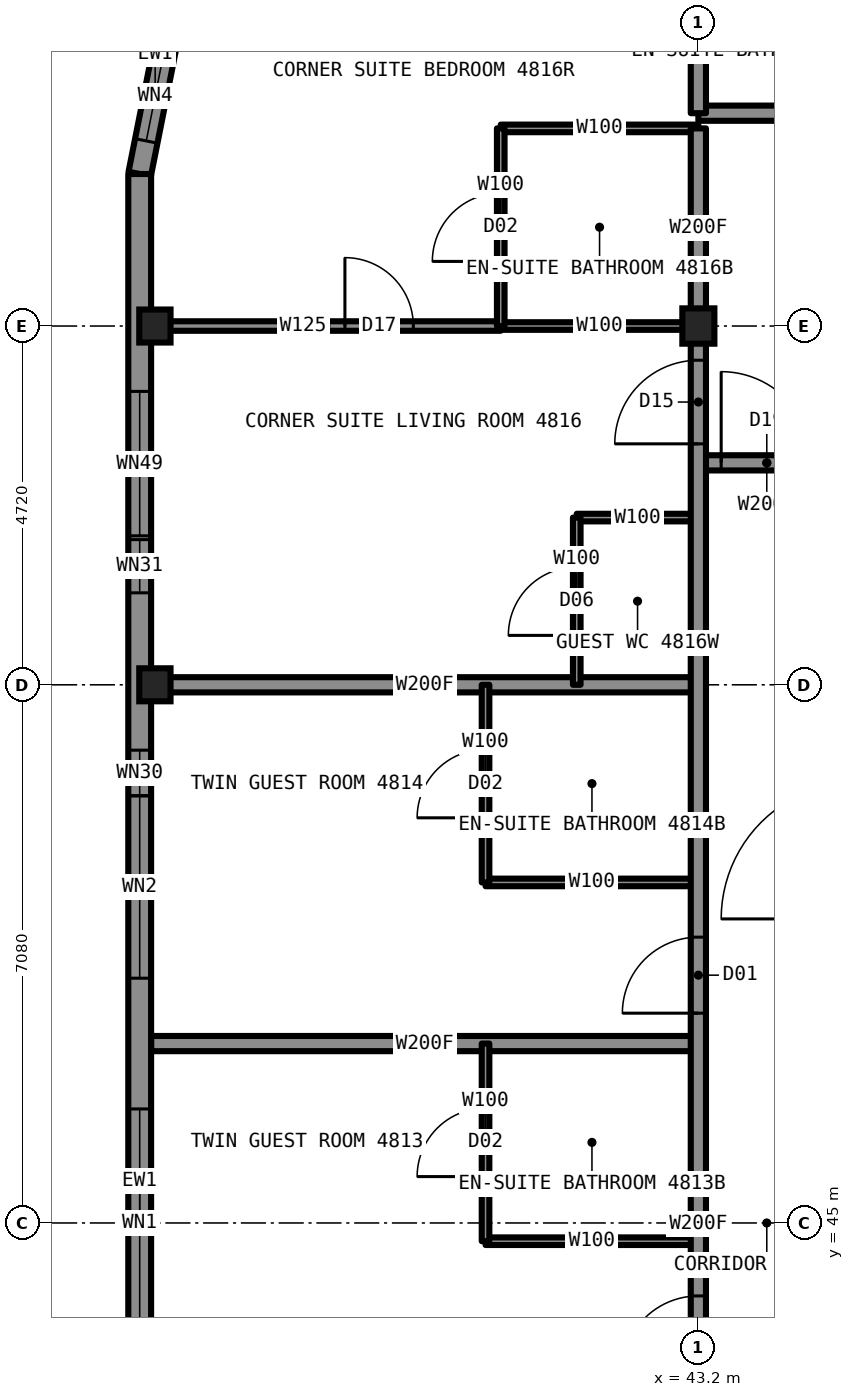
"""IFC4 building model, lengths in metres.
Left out: names, types, materials, properties, quantities, classifications, styles, units other than length and angle.
Written with IfcOpenShell. Run it as: python <this file> out.ifc"""

import sys

from ifc_helpers import new_model, si_unit, direction, frame, frame_2d, origin, origin_2d, place, context, subcontext, project, spatial, rectangle, i_section, extrude, element, fill, save


model = new_model("IFC4")
c1 = context("Model", 3, precision=1e-05, world=origin(), true_north=direction((0.0, 1.0)))
c2 = subcontext(c1, "Body", "Model", "MODEL_VIEW")
j1 = project(units=[si_unit("LENGTHUNIT", "METRE"), si_unit("PLANEANGLEUNIT", "RADIAN")], contexts=[c1])
p1 = place(None, origin())
s1 = spatial("IfcSite", under=j1, at=p1, CompositionType="ELEMENT")
p2 = place(p1, origin())
s2 = spatial("IfcBuilding", under=s1, at=p2, CompositionType="ELEMENT")
p3 = place(p2, frame((0.0, 0.0, 172.3)))
s3 = spatial("IfcBuildingStorey", under=s2, at=p3, CompositionType="ELEMENT", Elevation=172.3)
for number, where, z_axis, x_axis in (
    (1, (36.05, 52.08, 0.0), (0.0, 0.0, 1.0), (1.0, 0.0, 0.0)),
    (2, (36.05, 56.8, 0.0), (0.0, 0.0, 1.0), (1.0, 0.0, 0.0)),
):
    element("IfcColumn", number, at=place(p3, frame(where, z_axis=z_axis, x_axis=x_axis)), inside=s3, PredefinedType="COLUMN", context=c2, shape_type="SweptSolid", body=[
        extrude(i_section(OverallWidth=0.411, OverallDepth=0.434, WebThickness=0.036, FlangeThickness=0.057, at=origin_2d()), origin(), (0.0, 0.0, 1.0), 3.5),
    ])
p4 = place(p3, frame((43.2, 56.8, 0.0), z_axis=(0.0, 0.0, 1.0), x_axis=(1.0, 0.0, 0.0)))
e3 = element("IfcColumn", 3, at=p4, inside=s3, PredefinedType="COLUMN", context=c2, shape_type="SweptSolid", body=[
    extrude(i_section(OverallWidth=0.422, OverallDepth=0.465, WebThickness=0.045, FlangeThickness=0.073, at=origin_2d()), origin(), (0.0, 0.0, 1.0), 3.5),
])
p5 = place(p3, frame((40.4, 44.76, 0.0), z_axis=(0.0, 0.0, 1.0), x_axis=(1.0, 0.0, 0.0)))
e4 = element("IfcWall", 4, at=p5, inside=s3, PredefinedType="PARTITIONING", context=c2, shape_type="SweptSolid", body=[
    extrude(rectangle(XDim=2.8, YDim=0.1, at=frame_2d((1.4, 0.0))), origin(), (0.0, 0.0, 1.0), 3.33),
])
p6 = place(p3, frame((43.2, 55.0, 0.0), z_axis=(0.0, 0.0, 1.0), x_axis=(1.0, 0.0, 0.0)))
e5 = element("IfcWall", 5, at=p6, inside=s3, PredefinedType="PARTITIONING", context=c2, shape_type="SweptSolid", body=[
    extrude(rectangle(XDim=1.8, YDim=0.2, at=frame_2d((0.9, 0.0))), origin(), (0.0, 0.0, 1.0), 3.33),
])
p7 = place(p6, frame((0.3, 0.0, 0.0)))
e6 = element("IfcOpeningElement", 6, at=p7, cuts=e5, PredefinedType="OPENING", context=c2, shape_type="SweptSolid", body=[
    extrude(rectangle(XDim=1.2, YDim=2.2, at=frame_2d((0.6, 1.1))), frame((0.0, 0.11, 0.0), z_axis=(0.0, -1.0, 0.0), x_axis=(1.0, 0.0, 0.0)), (0.0, 0.0, 1.0), 0.22),
])
p8 = place(p3, frame((40.6, 56.8, 0.0), z_axis=(0.0, 0.0, 1.0), x_axis=(1.0, 0.0, 0.0)))
e7 = element("IfcWall", 7, at=p8, inside=s3, PredefinedType="PARTITIONING", context=c2, shape_type="SweptSolid", body=[
    extrude(rectangle(XDim=2.6, YDim=0.1, at=frame_2d((1.3, 0.0))), origin(), (0.0, 0.0, 1.0), 2.573),
])
p9 = place(p3, frame((36.0, 56.8, 0.0), z_axis=(0.0, 0.0, 1.0), x_axis=(1.0, 0.0, 0.0)))
e8 = element("IfcWall", 8, at=p9, inside=s3, PredefinedType="PARTITIONING", context=c2, shape_type="SweptSolid", body=[
    extrude(rectangle(XDim=4.6, YDim=0.125, at=frame_2d((2.3, 0.0))), origin(), (0.0, 0.0, 1.0), 2.573),
])
p10 = place(p9, frame((2.55, 0.0, 0.0)))
e9 = element("IfcOpeningElement", 9, at=p10, cuts=e8, PredefinedType="OPENING", context=c2, shape_type="SweptSolid", body=[
    extrude(rectangle(XDim=0.9, YDim=2.2, at=frame_2d((0.45, 1.1))), frame((0.0, 0.073, 0.0), z_axis=(0.0, -1.0, 0.0), x_axis=(1.0, 0.0, 0.0)), (0.0, 0.0, 1.0), 0.145),
])
p11 = place(p3, frame((40.6, 59.4, 0.0), z_axis=(0.0, 0.0, 1.0), x_axis=(1.0, 0.0, 0.0)))
e10 = element("IfcWall", 10, at=p11, inside=s3, PredefinedType="PARTITIONING", context=c2, shape_type="SweptSolid", body=[
    extrude(rectangle(XDim=2.6, YDim=0.1, at=frame_2d((1.3, 0.0))), origin(), (0.0, 0.0, 1.0), 3.33),
])
p12 = place(p3, frame((43.2, 59.6, 0.0), z_axis=(0.0, 0.0, 1.0), x_axis=(1.0, 0.0, 0.0)))
e11 = element("IfcWall", 11, at=p12, inside=s3, PredefinedType="PARTITIONING", context=c2, shape_type="SweptSolid", body=[
    extrude(rectangle(XDim=23.6, YDim=0.2, at=frame_2d((11.8, 0.0))), origin(), (0.0, 0.0, 1.0), 3.33),
])
p13 = place(p12, frame((2.55, 0.0, 0.0)))
e12 = element("IfcOpeningElement", 12, at=p13, cuts=e11, PredefinedType="OPENING", context=c2, shape_type="SweptSolid", body=[
    extrude(rectangle(XDim=1.0, YDim=2.2, at=frame_2d((0.5, 1.1))), frame((0.0, 0.11, 0.0), z_axis=(0.0, -1.0, 0.0), x_axis=(1.0, 0.0, 0.0)), (0.0, 0.0, 1.0), 0.22),
])
p14 = place(p12, frame((6.18, 0.0, 0.0)))
e13 = element("IfcOpeningElement", 13, at=p14, cuts=e11, PredefinedType="OPENING", context=c2, shape_type="SweptSolid", body=[
    extrude(rectangle(XDim=1.0, YDim=2.2, at=frame_2d((0.5, 1.1))), frame((0.0, 0.11, 0.0), z_axis=(0.0, -1.0, 0.0), x_axis=(1.0, 0.0, 0.0)), (0.0, 0.0, 1.0), 0.22),
])
p15 = place(p12, frame((10.9, 0.0, 0.0)))
e14 = element("IfcOpeningElement", 14, at=p15, cuts=e11, PredefinedType="OPENING", context=c2, shape_type="SweptSolid", body=[
    extrude(rectangle(XDim=1.0, YDim=2.2, at=frame_2d((0.5, 1.1))), frame((0.0, 0.11, 0.0), z_axis=(0.0, -1.0, 0.0), x_axis=(1.0, 0.0, 0.0)), (0.0, 0.0, 1.0), 0.22),
])
p16 = place(p12, frame((15.62, 0.0, 0.0)))
e15 = element("IfcOpeningElement", 15, at=p16, cuts=e11, PredefinedType="OPENING", context=c2, shape_type="SweptSolid", body=[
    extrude(rectangle(XDim=1.0, YDim=2.2, at=frame_2d((0.5, 1.1))), frame((0.0, 0.11, 0.0), z_axis=(0.0, -1.0, 0.0), x_axis=(1.0, 0.0, 0.0)), (0.0, 0.0, 1.0), 0.22),
])
p17 = place(p12, frame((19.28, 0.0, 0.0)))
e16 = element("IfcOpeningElement", 16, at=p17, cuts=e11, PredefinedType="OPENING", context=c2, shape_type="SweptSolid", body=[
    extrude(rectangle(XDim=1.0, YDim=2.2, at=frame_2d((0.5, 1.1))), frame((0.0, 0.11, 0.0), z_axis=(0.0, -1.0, 0.0), x_axis=(1.0, 0.0, 0.0)), (0.0, 0.0, 1.0), 0.22),
])
p18 = place(p3, frame((36.0, 47.36, 0.0), z_axis=(0.0, 0.0, 1.0), x_axis=(1.0, 0.0, 0.0)))
e17 = element("IfcWall", 17, at=p18, inside=s3, PredefinedType="PARTITIONING", context=c2, shape_type="SweptSolid", body=[
    extrude(rectangle(XDim=7.2, YDim=0.2, at=frame_2d((3.6, 0.0))), origin(), (0.0, 0.0, 1.0), 2.73),
])
p19 = place(p3, frame((40.4, 49.48, 0.0), z_axis=(0.0, 0.0, 1.0), x_axis=(1.0, 0.0, 0.0)))
e18 = element("IfcWall", 18, at=p19, inside=s3, PredefinedType="PARTITIONING", context=c2, shape_type="SweptSolid", body=[
    extrude(rectangle(XDim=2.8, YDim=0.1, at=frame_2d((1.4, 0.0))), origin(), (0.0, 0.0, 1.0), 3.33),
])
p20 = place(p3, frame((36.0, 52.08, 0.0), z_axis=(0.0, 0.0, 1.0), x_axis=(1.0, 0.0, 0.0)))
e19 = element("IfcWall", 19, at=p20, inside=s3, PredefinedType="PARTITIONING", context=c2, shape_type="SweptSolid", body=[
    extrude(rectangle(XDim=7.2, YDim=0.2, at=frame_2d((3.6, 0.0))), origin(), (0.0, 0.0, 1.0), 2.573),
])
p21 = place(p3, frame((41.6, 54.28, 0.0), z_axis=(0.0, 0.0, 1.0), x_axis=(1.0, 0.0, 0.0)))
e20 = element("IfcWall", 20, at=p21, inside=s3, PredefinedType="PARTITIONING", context=c2, shape_type="SweptSolid", body=[
    extrude(rectangle(XDim=1.6, YDim=0.1, at=frame_2d((0.8, 0.0))), origin(), (0.0, 0.0, 1.0), 3.33),
])
p22 = place(p3, frame((43.2, 33.2, 0.0), z_axis=(0.0, 0.0, 1.0), x_axis=(0.0, 1.0, 0.0)))
e21 = element("IfcWall", 21, at=p22, inside=s3, PredefinedType="PARTITIONING", context=c2, shape_type="SweptSolid", body=[
    extrude(rectangle(XDim=23.58, YDim=0.2, at=frame_2d((11.79, 0.0))), origin(), (0.0, 0.0, 1.0), 3.33),
])
p23 = place(p22, frame((6.18, 0.0, 0.0)))
e22 = element("IfcOpeningElement", 22, at=p23, cuts=e21, PredefinedType="OPENING", context=c2, shape_type="SweptSolid", body=[
    extrude(rectangle(XDim=1.0, YDim=2.2, at=frame_2d((0.5, 1.1))), frame((0.0, 0.11, 0.0), z_axis=(0.0, -1.0, 0.0), x_axis=(1.0, 0.0, 0.0)), (0.0, 0.0, 1.0), 0.22),
])
p24 = place(p22, frame((9.84, 0.0, 0.0)))
e23 = element("IfcOpeningElement", 23, at=p24, cuts=e21, PredefinedType="OPENING", context=c2, shape_type="SweptSolid", body=[
    extrude(rectangle(XDim=1.0, YDim=2.2, at=frame_2d((0.5, 1.1))), frame((0.0, 0.11, 0.0), z_axis=(0.0, -1.0, 0.0), x_axis=(1.0, 0.0, 0.0)), (0.0, 0.0, 1.0), 0.22),
])
p25 = place(p22, frame((14.56, 0.0, 0.0)))
e24 = element("IfcOpeningElement", 24, at=p25, cuts=e21, PredefinedType="OPENING", context=c2, shape_type="SweptSolid", body=[
    extrude(rectangle(XDim=1.0, YDim=2.2, at=frame_2d((0.5, 1.1))), frame((0.0, 0.11, 0.0), z_axis=(0.0, -1.0, 0.0), x_axis=(1.0, 0.0, 0.0)), (0.0, 0.0, 1.0), 0.22),
])
p26 = place(p22, frame((22.05, 0.0, 0.0)))
e25 = element("IfcOpeningElement", 25, at=p26, cuts=e21, PredefinedType="OPENING", context=c2, shape_type="SweptSolid", body=[
    extrude(rectangle(XDim=1.1, YDim=2.2, at=frame_2d((0.55, 1.1))), frame((0.0, 0.11, 0.0), z_axis=(0.0, -1.0, 0.0), x_axis=(1.0, 0.0, 0.0)), (0.0, 0.0, 1.0), 0.22),
])
p27 = place(p22, frame((0.66, 0.0, 0.0)))
e26 = element("IfcOpeningElement", 26, at=p27, cuts=e21, PredefinedType="OPENING", context=c2, shape_type="SweptSolid", body=[
    extrude(rectangle(XDim=1.1, YDim=2.2, at=frame_2d((0.55, 1.1))), frame((0.0, 0.11, 0.0), z_axis=(0.0, -1.0, 0.0), x_axis=(1.0, 0.0, 0.0)), (0.0, 0.0, 1.0), 0.22),
])
p28 = place(p3, frame((43.2, 59.6, 0.0), z_axis=(0.0, 0.0, 1.0), x_axis=(0.0, 1.0, 0.0)))
e27 = element("IfcWall", 27, at=p28, inside=s3, PredefinedType="PARTITIONING", context=c2, shape_type="SweptSolid", body=[
    extrude(rectangle(XDim=4.4, YDim=0.2, at=frame_2d((2.2, 0.0))), origin(), (0.0, 0.0, 1.0), 2.573),
])
p29 = place(p3, frame((41.6, 52.08, 0.0), z_axis=(0.0, 0.0, 1.0), x_axis=(0.0, 1.0, 0.0)))
e28 = element("IfcWall", 28, at=p29, inside=s3, PredefinedType="PARTITIONING", context=c2, shape_type="SweptSolid", body=[
    extrude(rectangle(XDim=2.2, YDim=0.1, at=frame_2d((1.1, 0.0))), origin(), (0.0, 0.0, 1.0), 3.33),
])
p30 = place(p29, frame((0.65, 0.0, 0.0)))
e29 = element("IfcOpeningElement", 29, at=p30, cuts=e28, PredefinedType="OPENING", context=c2, shape_type="SweptSolid", body=[
    extrude(rectangle(XDim=0.9, YDim=2.1, at=frame_2d((0.45, 1.05))), frame((0.0, 0.06, 0.0), z_axis=(0.0, -1.0, 0.0), x_axis=(1.0, 0.0, 0.0)), (0.0, 0.0, 1.0), 0.12),
])
p31 = place(p3, frame((40.6, 56.8, 0.0), z_axis=(0.0, 0.0, 1.0), x_axis=(0.0, 1.0, 0.0)))
e30 = element("IfcWall", 30, at=p31, inside=s3, PredefinedType="PARTITIONING", context=c2, shape_type="SweptSolid", body=[
    extrude(rectangle(XDim=2.6, YDim=0.1, at=frame_2d((1.3, 0.0))), origin(), (0.0, 0.0, 1.0), 3.33),
])
p32 = place(p31, frame((0.85, 0.0, 0.0)))
e31 = element("IfcOpeningElement", 31, at=p32, cuts=e30, PredefinedType="OPENING", context=c2, shape_type="SweptSolid", body=[
    extrude(rectangle(XDim=0.9, YDim=2.1, at=frame_2d((0.45, 1.05))), frame((0.0, 0.06, 0.0), z_axis=(0.0, -1.0, 0.0), x_axis=(1.0, 0.0, 0.0)), (0.0, 0.0, 1.0), 0.12),
])
p33 = place(p3, frame((40.4, 44.76, 0.0), z_axis=(0.0, 0.0, 1.0), x_axis=(0.0, 1.0, 0.0)))
e32 = element("IfcWall", 32, at=p33, inside=s3, PredefinedType="PARTITIONING", context=c2, shape_type="SweptSolid", body=[
    extrude(rectangle(XDim=2.6, YDim=0.1, at=frame_2d((1.3, 0.0))), origin(), (0.0, 0.0, 1.0), 3.33),
])
p34 = place(p33, frame((0.85, 0.0, 0.0)))
e33 = element("IfcOpeningElement", 33, at=p34, cuts=e32, PredefinedType="OPENING", context=c2, shape_type="SweptSolid", body=[
    extrude(rectangle(XDim=0.9, YDim=2.1, at=frame_2d((0.45, 1.05))), frame((0.0, 0.06, 0.0), z_axis=(0.0, -1.0, 0.0), x_axis=(1.0, 0.0, 0.0)), (0.0, 0.0, 1.0), 0.12),
])
p35 = place(p3, frame((40.4, 49.48, 0.0), z_axis=(0.0, 0.0, 1.0), x_axis=(0.0, 1.0, 0.0)))
e34 = element("IfcWall", 34, at=p35, inside=s3, PredefinedType="PARTITIONING", context=c2, shape_type="SweptSolid", body=[
    extrude(rectangle(XDim=2.6, YDim=0.1, at=frame_2d((1.3, 0.0))), origin(), (0.0, 0.0, 1.0), 3.33),
])
p36 = place(p35, frame((0.85, 0.0, 0.0)))
e35 = element("IfcOpeningElement", 35, at=p36, cuts=e34, PredefinedType="OPENING", context=c2, shape_type="SweptSolid", body=[
    extrude(rectangle(XDim=0.9, YDim=2.1, at=frame_2d((0.45, 1.05))), frame((0.0, 0.06, 0.0), z_axis=(0.0, -1.0, 0.0), x_axis=(1.0, 0.0, 0.0)), (0.0, 0.0, 1.0), 0.12),
])
p37 = place(p3, frame((36.257, 60.847, 0.0), z_axis=(0.0, 0.0, 1.0), x_axis=(-0.195081421501, -0.980787050784, 0.0)))
e36 = element("IfcWall", 36, at=p37, inside=s3, PredefinedType="SOLIDWALL", context=c2, shape_type="SweptSolid", body=[
    extrude(rectangle(XDim=2.087, YDim=0.3, at=frame_2d((1.044, 0.0))), origin(), (0.0, 0.0, 1.0), 3.33),
])
p38 = place(p37, frame((0.444, 0.0, 0.3)))
e37 = element("IfcOpeningElement", 37, at=p38, cuts=e36, PredefinedType="OPENING", context=c2, shape_type="SweptSolid", body=[
    extrude(rectangle(XDim=1.2, YDim=2.0, at=frame_2d((0.6, 1.0))), frame((0.0, 0.16, 0.0), z_axis=(0.0, -1.0, 0.0), x_axis=(1.0, 0.0, 0.0)), (0.0, 0.0, 1.0), 0.32),
])
p39 = place(p3, frame((35.85, 58.8, 0.0), z_axis=(0.0, 0.0, 1.0), x_axis=(0.0, -1.0, 0.0)))
e38 = element("IfcWall", 38, at=p39, inside=s3, PredefinedType="SOLIDWALL", context=c2, shape_type="SweptSolid", body=[
    extrude(rectangle(XDim=27.6, YDim=0.3, at=frame_2d((13.8, 0.0))), origin(), (0.0, 0.0, 1.0), 2.83),
])
p40 = place(p39, frame((3.46, 0.0, 0.3)))
e39 = element("IfcOpeningElement", 39, at=p40, cuts=e38, PredefinedType="OPENING", context=c2, shape_type="SweptSolid", body=[
    extrude(rectangle(XDim=2.4, YDim=2.0, at=frame_2d((1.2, 1.0))), frame((0.0, 0.16, 0.0), z_axis=(0.0, -1.0, 0.0), x_axis=(1.0, 0.0, 0.0)), (0.0, 0.0, 1.0), 0.32),
])
p41 = place(p39, frame((7.58, 0.0, 0.3)))
e40 = element("IfcOpeningElement", 40, at=p41, cuts=e38, PredefinedType="OPENING", context=c2, shape_type="SweptSolid", body=[
    extrude(rectangle(XDim=3.0, YDim=2.0, at=frame_2d((1.5, 1.0))), frame((0.0, 0.16, 0.0), z_axis=(0.0, -1.0, 0.0), x_axis=(1.0, 0.0, 0.0)), (0.0, 0.0, 1.0), 0.32),
])
p42 = place(p39, frame((12.3, 0.0, 0.3)))
e41 = element("IfcOpeningElement", 41, at=p42, cuts=e38, PredefinedType="OPENING", context=c2, shape_type="SweptSolid", body=[
    extrude(rectangle(XDim=3.0, YDim=2.0, at=frame_2d((1.5, 1.0))), frame((0.0, 0.16, 0.0), z_axis=(0.0, -1.0, 0.0), x_axis=(1.0, 0.0, 0.0)), (0.0, 0.0, 1.0), 0.32),
])
p43 = place(p39, frame((17.02, 0.0, 0.3)))
e42 = element("IfcOpeningElement", 42, at=p43, cuts=e38, PredefinedType="OPENING", context=c2, shape_type="SweptSolid", body=[
    extrude(rectangle(XDim=3.0, YDim=2.0, at=frame_2d((1.5, 1.0))), frame((0.0, 0.16, 0.0), z_axis=(0.0, -1.0, 0.0), x_axis=(1.0, 0.0, 0.0)), (0.0, 0.0, 1.0), 0.32),
])
p44 = place(p39, frame((21.74, 0.0, 0.3)))
e43 = element("IfcOpeningElement", 43, at=p44, cuts=e38, PredefinedType="OPENING", context=c2, shape_type="SweptSolid", body=[
    extrude(rectangle(XDim=2.4, YDim=2.0, at=frame_2d((1.2, 1.0))), frame((0.0, 0.16, 0.0), z_axis=(0.0, -1.0, 0.0), x_axis=(1.0, 0.0, 0.0)), (0.0, 0.0, 1.0), 0.32),
])
p45 = place(p39, frame((2.86, 0.0, 0.3)))
e44 = element("IfcOpeningElement", 44, at=p45, cuts=e38, PredefinedType="OPENING", context=c2, shape_type="SweptSolid", body=[
    extrude(rectangle(XDim=0.6, YDim=1.1, at=frame_2d((0.3, 0.55))), frame((0.0, 0.16, 0.0), z_axis=(0.0, -1.0, 0.0), x_axis=(1.0, 0.0, 0.0)), (0.0, 0.0, 1.0), 0.32),
])
p46 = place(p39, frame((24.14, 0.0, 0.3)))
e45 = element("IfcOpeningElement", 45, at=p46, cuts=e38, PredefinedType="OPENING", context=c2, shape_type="SweptSolid", body=[
    extrude(rectangle(XDim=0.6, YDim=1.1, at=frame_2d((0.3, 0.55))), frame((0.0, 0.16, 0.0), z_axis=(0.0, -1.0, 0.0), x_axis=(1.0, 0.0, 0.0)), (0.0, 0.0, 1.0), 0.32),
])
p47 = place(p3, frame((43.2, 56.78, 0.0), z_axis=(0.0, 0.0, 1.0), x_axis=(0.0, 1.0, 0.0)))
e46 = element("IfcWall", 46, at=p47, inside=s3, PredefinedType="PARTITIONING", context=c2, shape_type="SweptSolid", body=[
    extrude(rectangle(XDim=2.62, YDim=0.2, at=frame_2d((1.31, 0.0))), origin(), (0.0, 0.0, 1.0), 2.573),
])
p48 = place(p7, origin())
e47 = element("IfcDoor", 47, at=p48, inside=s3, OperationType="SINGLE_SWING_LEFT", PredefinedType="DOOR", context=c2, shape_type="SweptSolid", body=[
    extrude(rectangle(XDim=1.2, YDim=2.2, at=frame_2d((0.6, 1.1))), frame((0.0, 0.025, 0.0), z_axis=(0.0, -1.0, 0.0), x_axis=(1.0, 0.0, 0.0)), (0.0, 0.0, 1.0), 0.05),
])
fill(e6, e47)
p49 = place(p24, origin())
e48 = element("IfcDoor", 48, at=p49, inside=s3, OperationType="SINGLE_SWING_LEFT", PredefinedType="DOOR", context=c2, shape_type="SweptSolid", body=[
    extrude(rectangle(XDim=1.0, YDim=2.2, at=frame_2d((0.5, 1.1))), frame((0.0, 0.025, 0.0), z_axis=(0.0, -1.0, 0.0), x_axis=(1.0, 0.0, 0.0)), (0.0, 0.0, 1.0), 0.05),
])
fill(e23, e48)
p50 = place(p34, origin())
e49 = element("IfcDoor", 49, at=p50, inside=s3, OperationType="SINGLE_SWING_RIGHT", PredefinedType="DOOR", context=c2, shape_type="SweptSolid", body=[
    extrude(rectangle(XDim=0.9, YDim=2.1, at=frame_2d((0.45, 1.05))), frame((0.0, 0.025, 0.0), z_axis=(0.0, -1.0, 0.0), x_axis=(1.0, 0.0, 0.0)), (0.0, 0.0, 1.0), 0.05),
])
fill(e33, e49)
p51 = place(p25, origin())
e50 = element("IfcDoor", 50, at=p51, inside=s3, OperationType="SINGLE_SWING_LEFT", PredefinedType="DOOR", context=c2, shape_type="SweptSolid", body=[
    extrude(rectangle(XDim=1.0, YDim=2.2, at=frame_2d((0.5, 1.1))), frame((0.0, 0.025, 0.0), z_axis=(0.0, -1.0, 0.0), x_axis=(1.0, 0.0, 0.0)), (0.0, 0.0, 1.0), 0.05),
])
fill(e24, e50)
p52 = place(p36, origin())
e51 = element("IfcDoor", 51, at=p52, inside=s3, OperationType="SINGLE_SWING_RIGHT", PredefinedType="DOOR", context=c2, shape_type="SweptSolid", body=[
    extrude(rectangle(XDim=0.9, YDim=2.1, at=frame_2d((0.45, 1.05))), frame((0.0, 0.025, 0.0), z_axis=(0.0, -1.0, 0.0), x_axis=(1.0, 0.0, 0.0)), (0.0, 0.0, 1.0), 0.05),
])
fill(e35, e51)
p53 = place(p26, origin())
e52 = element("IfcDoor", 52, at=p53, inside=s3, OperationType="SINGLE_SWING_LEFT", PredefinedType="DOOR", context=c2, shape_type="SweptSolid", body=[
    extrude(rectangle(XDim=1.1, YDim=2.2, at=frame_2d((0.55, 1.1))), frame((0.0, 0.025, 0.0), z_axis=(0.0, -1.0, 0.0), x_axis=(1.0, 0.0, 0.0)), (0.0, 0.0, 1.0), 0.05),
])
fill(e25, e52)
p54 = place(p32, origin())
e53 = element("IfcDoor", 53, at=p54, inside=s3, OperationType="SINGLE_SWING_RIGHT", PredefinedType="DOOR", context=c2, shape_type="SweptSolid", body=[
    extrude(rectangle(XDim=0.9, YDim=2.1, at=frame_2d((0.45, 1.05))), frame((0.0, 0.025, 0.0), z_axis=(0.0, -1.0, 0.0), x_axis=(1.0, 0.0, 0.0)), (0.0, 0.0, 1.0), 0.05),
])
fill(e31, e53)
p55 = place(p10, origin())
e54 = element("IfcDoor", 54, at=p55, inside=s3, OperationType="SINGLE_SWING_LEFT", PredefinedType="DOOR", context=c2, shape_type="SweptSolid", body=[
    extrude(rectangle(XDim=0.9, YDim=2.2, at=frame_2d((0.45, 1.1))), frame((0.0, 0.025, 0.0), z_axis=(0.0, -1.0, 0.0), x_axis=(1.0, 0.0, 0.0)), (0.0, 0.0, 1.0), 0.05),
])
fill(e9, e54)
p56 = place(p30, origin())
e55 = element("IfcDoor", 55, at=p56, inside=s3, OperationType="SINGLE_SWING_LEFT", PredefinedType="DOOR", context=c2, shape_type="SweptSolid", body=[
    extrude(rectangle(XDim=0.9, YDim=2.1, at=frame_2d((0.45, 1.05))), frame((0.0, 0.025, 0.0), z_axis=(0.0, -1.0, 0.0), x_axis=(1.0, 0.0, 0.0)), (0.0, 0.0, 1.0), 0.05),
])
fill(e29, e55)
p57 = place(p38, origin())
e56 = element("IfcWindow", 56, at=p57, inside=s3, PartitioningType="SINGLE_PANEL", PredefinedType="WINDOW", context=c2, shape_type="SweptSolid", body=[
    extrude(rectangle(XDim=1.2, YDim=2.0, at=frame_2d((0.6, 1.0))), frame((0.0, 0.13, 0.0), z_axis=(0.0, -1.0, 0.0), x_axis=(1.0, 0.0, 0.0)), (0.0, 0.0, 1.0), 0.06),
])
fill(e37, e56)
p58 = place(p40, origin())
e57 = element("IfcWindow", 57, at=p58, inside=s3, PartitioningType="SINGLE_PANEL", PredefinedType="WINDOW", context=c2, shape_type="SweptSolid", body=[
    extrude(rectangle(XDim=2.4, YDim=2.0, at=frame_2d((1.2, 1.0))), frame((0.0, 0.13, 0.0), z_axis=(0.0, -1.0, 0.0), x_axis=(1.0, 0.0, 0.0)), (0.0, 0.0, 1.0), 0.06),
])
fill(e39, e57)
p59 = place(p41, origin())
e58 = element("IfcWindow", 58, at=p59, inside=s3, PartitioningType="SINGLE_PANEL", PredefinedType="WINDOW", context=c2, shape_type="SweptSolid", body=[
    extrude(rectangle(XDim=3.0, YDim=2.0, at=frame_2d((1.5, 1.0))), frame((0.0, 0.13, 0.0), z_axis=(0.0, -1.0, 0.0), x_axis=(1.0, 0.0, 0.0)), (0.0, 0.0, 1.0), 0.06),
])
fill(e40, e58)
p60 = place(p42, origin())
e59 = element("IfcWindow", 59, at=p60, inside=s3, PartitioningType="SINGLE_PANEL", PredefinedType="WINDOW", context=c2, shape_type="SweptSolid", body=[
    extrude(rectangle(XDim=3.0, YDim=2.0, at=frame_2d((1.5, 1.0))), frame((0.0, 0.13, 0.0), z_axis=(0.0, -1.0, 0.0), x_axis=(1.0, 0.0, 0.0)), (0.0, 0.0, 1.0), 0.06),
])
fill(e41, e59)
p61 = place(p45, origin())
e60 = element("IfcWindow", 60, at=p61, inside=s3, PartitioningType="SINGLE_PANEL", PredefinedType="WINDOW", context=c2, shape_type="SweptSolid", body=[
    extrude(rectangle(XDim=0.6, YDim=1.1, at=frame_2d((0.3, 0.55))), frame((0.0, 0.13, 0.0), z_axis=(0.0, -1.0, 0.0), x_axis=(1.0, 0.0, 0.0)), (0.0, 0.0, 1.0), 0.06),
])
fill(e44, e60)
save(model, sys.argv[1])
